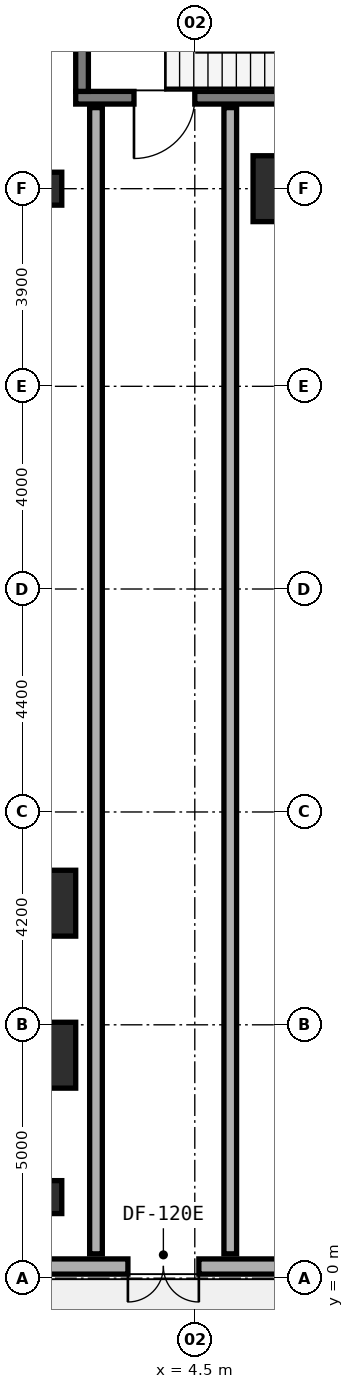
"""IFC4 building model, lengths in metres.
Left out: names, types, materials, properties, quantities, classifications, styles, units other than length and angle.
Written with IfcOpenShell. Run it as: python <this file> out.ifc"""

import sys

from ifc_helpers import new_model, si_unit, direction, frame, frame_2d, origin, origin_2d, place, context, subcontext, project, spatial, rectangle, extrude, element, fill, save


model = new_model("IFC4")
c1 = context("Model", 3, precision=1e-05, world=origin(), true_north=direction((0.0, 1.0)))
c2 = subcontext(c1, "Body", "Model", "MODEL_VIEW")
j1 = project(units=[si_unit("LENGTHUNIT", "METRE"), si_unit("PLANEANGLEUNIT", "RADIAN")], contexts=[c1])
p1 = place(None, origin())
s1 = spatial("IfcSite", under=j1, at=p1, CompositionType="ELEMENT")
p2 = place(p1, origin())
s2 = spatial("IfcBuilding", under=s1, at=p2, CompositionType="ELEMENT")
p3 = place(p2, origin())
s3 = spatial("IfcBuildingStorey", under=s2, at=p3, CompositionType="ELEMENT", Elevation=0.0)
p4 = place(p3, frame((2.15, 23.295, 0.0), z_axis=(0.0, 0.0, 1.0), x_axis=(1.0, 0.0, 0.0)))
e1 = element("IfcWall", 1, at=p4, inside=s3, PredefinedType="STANDARD", context=c2, shape_type="SweptSolid", body=[
    extrude(rectangle(XDim=7.5, YDim=0.25, at=frame_2d((3.75, 0.0))), origin(), (0.0, 0.0, 1.0), 5.4),
])
p5 = place(p4, frame((1.15, 0.0, 0.0)))
e2 = element("IfcOpeningElement", 2, at=p5, cuts=e1, PredefinedType="OPENING", context=c2, shape_type="SweptSolid", body=[
    extrude(rectangle(XDim=1.2, YDim=2.15, at=frame_2d((0.6, 1.075))), frame((0.0, 0.135, 0.0), z_axis=(0.0, -1.0, 0.0), x_axis=(1.0, 0.0, 0.0)), (0.0, 0.0, 1.0), 0.27),
])
p6 = place(p3, frame((2.275, 23.42, 0.0), z_axis=(0.0, 0.0, 1.0), x_axis=(0.0, 1.0, 0.0)))
e3 = element("IfcWall", 3, at=p6, inside=s3, PredefinedType="STANDARD", context=c2, shape_type="SweptSolid", body=[
    extrude(rectangle(XDim=3.16, YDim=0.25, at=frame_2d((1.58, 0.0))), origin(), (0.0, 0.0, 1.0), 5.4),
])
p7 = place(p3, frame((6.2, 21.5, 0.0), z_axis=(0.0, 0.0, 1.0), x_axis=(1.0, 0.0, 0.0)))
e4 = element("IfcColumn", 4, at=p7, inside=s3, PredefinedType="COLUMN", context=c2, shape_type="SweptSolid", body=[
    extrude(rectangle(XDim=1.1, YDim=1.3, at=origin_2d()), origin(), (0.0, 0.0, 1.0), 5.4),
])
for number, where, z_axis, x_axis in (
    (5, (1.6, 21.5, 0.0), (0.0, 0.0, 1.0), (1.0, 0.0, 0.0)),
    (6, (1.6, 1.6, 0.0), (0.0, 0.0, 1.0), (1.0, 0.0, 0.0)),
):
    element("IfcColumn", number, at=place(p3, frame(where, z_axis=z_axis, x_axis=x_axis)), inside=s3, PredefinedType="PILASTER", context=c2, shape_type="SweptSolid", body=[
        extrude(rectangle(XDim=0.55, YDim=0.65, at=origin_2d()), origin(), (0.0, 0.0, 1.0), 5.4),
    ])
for number, where, z_axis, x_axis in (
    (7, (1.6, 4.4, 0.0), (0.0, 0.0, 1.0), (1.0, 0.0, 0.0)),
    (8, (1.6, 7.4, 0.0), (0.0, 0.0, 1.0), (1.0, 0.0, 0.0)),
):
    element("IfcColumn", number, at=place(p3, frame(where, z_axis=z_axis, x_axis=x_axis)), inside=s3, PredefinedType="COLUMN", context=c2, shape_type="SweptSolid", body=[
        extrude(rectangle(XDim=1.1, YDim=1.3, at=origin_2d()), origin(), (0.0, 0.0, 1.0), 5.4),
    ])
p8 = place(p3, frame((0.055, 0.23, 0.0), z_axis=(0.0, 0.0, 1.0), x_axis=(1.0, 0.0, 0.0)))
e9 = element("IfcWall", 9, at=p8, inside=s3, PredefinedType="STANDARD", context=c2, shape_type="SweptSolid", body=[
    extrude(rectangle(XDim=8.02, YDim=0.3, at=frame_2d((4.01, 0.0))), origin(), (0.0, 0.0, 1.0), 5.05),
])
p9 = place(p8, frame((3.125, 0.0, 0.0)))
e10 = element("IfcOpeningElement", 10, at=p9, cuts=e9, PredefinedType="OPENING", context=c2, shape_type="SweptSolid", body=[
    extrude(rectangle(XDim=1.4, YDim=2.2, at=frame_2d((0.7, 1.1))), frame((0.0, 0.16, 0.0), z_axis=(0.0, -1.0, 0.0), x_axis=(1.0, 0.0, 0.0)), (0.0, 0.0, 1.0), 0.32),
])
for number, where, z_axis, x_axis in (
    (11, (2.55, 0.48, 0.0), (0.0, 0.0, 1.0), (0.0, 1.0, 0.0)),
    (12, (5.2, 0.48, 0.0), (0.0, 0.0, 1.0), (0.0, 1.0, 0.0)),
):
    element("IfcWall", number, at=place(p3, frame(where, z_axis=z_axis, x_axis=x_axis)), inside=s3, PredefinedType="SOLIDWALL", context=c2, shape_type="SweptSolid", body=[
        extrude(rectangle(XDim=22.62, YDim=0.25, at=frame_2d((11.31, 0.0))), origin(), (0.0, 0.0, 1.0), 4.125),
    ])
p10 = place(p9, frame((1.4, 0.0, 0.0), z_axis=(0.0, 0.0, 1.0), x_axis=(-1.0, 0.0, 0.0)))
e13 = element("IfcDoor", 13, at=p10, inside=s3, OperationType="DOUBLE_DOOR_SINGLE_SWING", PredefinedType="DOOR", context=c2, shape_type="SweptSolid", body=[
    extrude(rectangle(XDim=1.4, YDim=2.2, at=frame_2d((0.7, 1.1))), frame((0.0, 0.025, 0.0), z_axis=(0.0, -1.0, 0.0), x_axis=(1.0, 0.0, 0.0)), (0.0, 0.0, 1.0), 0.05),
])
fill(e10, e13)
p11 = place(p5, frame((1.2, 0.0, 0.0), z_axis=(0.0, 0.0, 1.0), x_axis=(-1.0, 0.0, 0.0)))
e14 = element("IfcDoor", 14, at=p11, inside=s3, OperationType="SINGLE_SWING_RIGHT", PredefinedType="DOOR", context=c2, shape_type="SweptSolid", body=[
    extrude(rectangle(XDim=1.2, YDim=2.15, at=frame_2d((0.6, 1.075))), frame((0.0, 0.025, 0.0), z_axis=(0.0, -1.0, 0.0), x_axis=(1.0, 0.0, 0.0)), (0.0, 0.0, 1.0), 0.05),
])
fill(e2, e14)
save(model, sys.argv[1])
